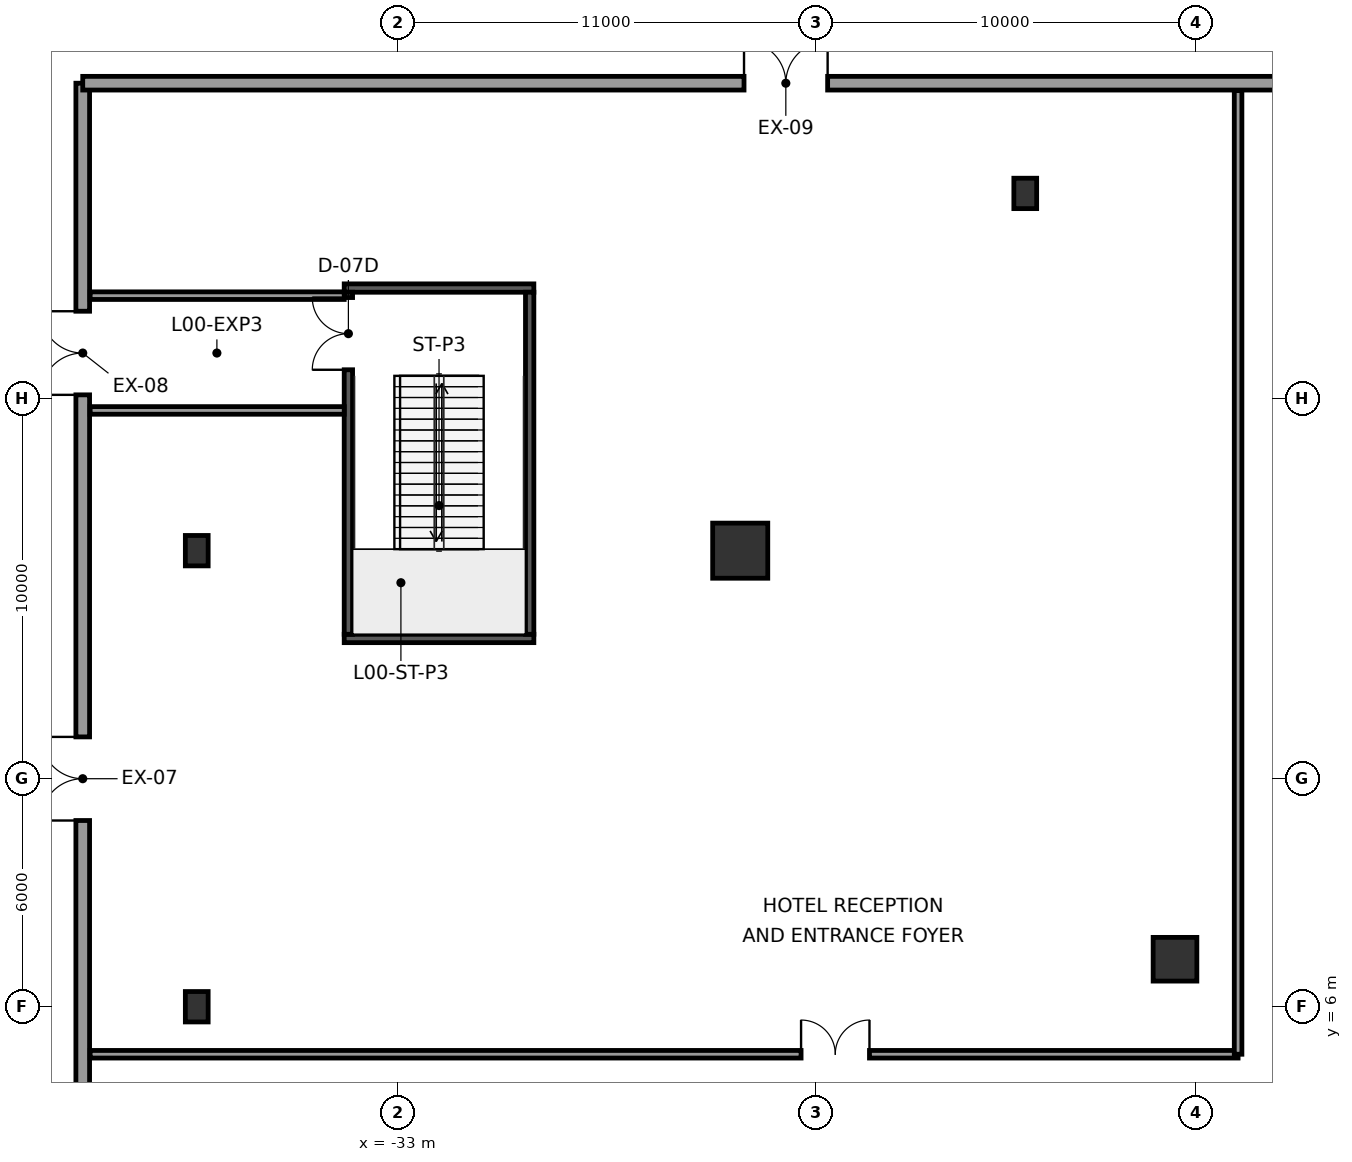
"""IFC4 building model, lengths in metres.
Left out: names, types, materials, properties, quantities, classifications, styles, units other than length and angle.
Written with IfcOpenShell. Run it as: python <this file> out.ifc"""

import sys

from ifc_helpers import new_model, si_unit, direction, frame, frame_2d, origin, origin_2d, place, context, subcontext, project, spatial, rectangle, hollow_rectangle, extrude, element, fill, save


model = new_model("IFC4")
c1 = context("Model", 3, precision=1e-05, world=origin(), true_north=direction((0.0, 1.0)))
c2 = subcontext(c1, "Body", "Model", "MODEL_VIEW")
j1 = project(units=[si_unit("LENGTHUNIT", "METRE"), si_unit("PLANEANGLEUNIT", "RADIAN")], contexts=[c1])
p1 = place(None, origin())
s1 = spatial("IfcSite", under=j1, at=p1, CompositionType="ELEMENT")
p2 = place(p1, origin())
s2 = spatial("IfcBuilding", under=s1, at=p2, CompositionType="ELEMENT")
p3 = place(p2, origin())
s3 = spatial("IfcBuildingStorey", under=s2, at=p3, CompositionType="ELEMENT", Elevation=0.0)
p4 = place(p3, frame((-12.56, 7.25, 0.0), z_axis=(0.0, 0.0, 1.0), x_axis=(1.0, 0.0, 0.0)))
e1 = element("IfcColumn", 1, at=p4, inside=s3, PredefinedType="COLUMN", context=c2, shape_type="SweptSolid", body=[
    extrude(rectangle(XDim=1.15, YDim=1.15, at=origin_2d()), origin(), (0.0, 0.0, 1.0), 6.0),
])
p5 = place(p3, frame((-24.0, 18.0, 0.0), z_axis=(0.0, 0.0, 1.0), x_axis=(1.0, 0.0, 0.0)))
e2 = element("IfcColumn", 2, at=p5, inside=s3, PredefinedType="COLUMN", context=c2, shape_type="SweptSolid", body=[
    extrude(rectangle(XDim=1.45, YDim=1.45, at=origin_2d()), origin(), (0.0, 0.0, 1.0), 6.0),
])
for number, where, z_axis, x_axis in (
    (3, (-38.3, 6.0, 0.0), (0.0, 0.0, 1.0), (1.0, 0.0, 0.0)),
    (4, (-38.3, 18.0, 0.0), (0.0, 0.0, 1.0), (1.0, 0.0, 0.0)),
    (5, (-16.5, 27.4, 0.0), (0.0, 0.0, 1.0), (1.0, 0.0, 0.0)),
):
    element("IfcColumn", number, at=place(p3, frame(where, z_axis=z_axis, x_axis=x_axis)), inside=s3, PredefinedType="COLUMN", context=c2, shape_type="SweptSolid", body=[
        extrude(hollow_rectangle(XDim=0.6, YDim=0.8, WallThickness=0.05, at=origin_2d()), origin(), (0.0, 0.0, 1.0), 6.0),
    ])
p6 = place(p3, frame((-41.3, -30.3, 0.0), z_axis=(0.0, 0.0, 1.0), x_axis=(0.0, 1.0, 0.0)))
e6 = element("IfcWall", 6, at=p6, inside=s3, PredefinedType="STANDARD", context=c2, shape_type="SweptSolid", body=[
    extrude(rectangle(XDim=60.6, YDim=0.36, at=frame_2d((30.3, 0.0))), origin(), (0.0, 0.0, 1.0), 5.7),
])
p7 = place(p6, frame((6.0, 0.0, 0.0)))
e7 = element("IfcOpeningElement", 7, at=p7, cuts=e6, PredefinedType="OPENING", context=c2, shape_type="SweptSolid", body=[
    extrude(rectangle(XDim=2.2, YDim=2.4, at=frame_2d((1.1, 1.2))), frame((0.0, 0.19, 0.0), z_axis=(0.0, -1.0, 0.0), x_axis=(1.0, 0.0, 0.0)), (0.0, 0.0, 1.0), 0.38),
])
p8 = place(p6, frame((18.0, 0.0, 0.0)))
e8 = element("IfcOpeningElement", 8, at=p8, cuts=e6, PredefinedType="OPENING", context=c2, shape_type="SweptSolid", body=[
    extrude(rectangle(XDim=2.2, YDim=2.4, at=frame_2d((1.1, 1.2))), frame((0.0, 0.19, 0.0), z_axis=(0.0, -1.0, 0.0), x_axis=(1.0, 0.0, 0.0)), (0.0, 0.0, 1.0), 0.38),
])
p9 = place(p6, frame((41.2, 0.0, 0.0)))
e9 = element("IfcOpeningElement", 9, at=p9, cuts=e6, PredefinedType="OPENING", context=c2, shape_type="SweptSolid", body=[
    extrude(rectangle(XDim=2.2, YDim=2.4, at=frame_2d((1.1, 1.2))), frame((0.0, 0.19, 0.0), z_axis=(0.0, -1.0, 0.0), x_axis=(1.0, 0.0, 0.0)), (0.0, 0.0, 1.0), 0.38),
])
p10 = place(p6, frame((52.4, 0.0, 0.0)))
e10 = element("IfcOpeningElement", 10, at=p10, cuts=e6, PredefinedType="OPENING", context=c2, shape_type="SweptSolid", body=[
    extrude(rectangle(XDim=2.2, YDim=2.4, at=frame_2d((1.1, 1.2))), frame((0.0, 0.19, 0.0), z_axis=(0.0, -1.0, 0.0), x_axis=(1.0, 0.0, 0.0)), (0.0, 0.0, 1.0), 0.38),
])
p11 = place(p3, frame((-41.3, 30.3, 0.0), z_axis=(0.0, 0.0, 1.0), x_axis=(1.0, 0.0, 0.0)))
e11 = element("IfcWall", 11, at=p11, inside=s3, PredefinedType="STANDARD", context=c2, shape_type="SweptSolid", body=[
    extrude(rectangle(XDim=82.6, YDim=0.36, at=frame_2d((41.3, 0.0))), origin(), (0.0, 0.0, 1.0), 5.7),
])
p12 = place(p11, frame((17.4, 0.0, 0.0)))
e12 = element("IfcOpeningElement", 12, at=p12, cuts=e11, PredefinedType="OPENING", context=c2, shape_type="SweptSolid", body=[
    extrude(rectangle(XDim=2.2, YDim=2.4, at=frame_2d((1.1, 1.2))), frame((0.0, 0.19, 0.0), z_axis=(0.0, -1.0, 0.0), x_axis=(1.0, 0.0, 0.0)), (0.0, 0.0, 1.0), 0.38),
])
p13 = place(p11, frame((33.4, 0.0, 0.0)))
e13 = element("IfcOpeningElement", 13, at=p13, cuts=e11, PredefinedType="OPENING", context=c2, shape_type="SweptSolid", body=[
    extrude(rectangle(XDim=2.2, YDim=2.4, at=frame_2d((1.1, 1.2))), frame((0.0, 0.19, 0.0), z_axis=(0.0, -1.0, 0.0), x_axis=(1.0, 0.0, 0.0)), (0.0, 0.0, 1.0), 0.38),
])
p14 = place(p11, frame((61.0, 0.0, 0.0)))
e14 = element("IfcOpeningElement", 14, at=p14, cuts=e11, PredefinedType="OPENING", context=c2, shape_type="SweptSolid", body=[
    extrude(rectangle(XDim=2.2, YDim=2.4, at=frame_2d((1.1, 1.2))), frame((0.0, 0.19, 0.0), z_axis=(0.0, -1.0, 0.0), x_axis=(1.0, 0.0, 0.0)), (0.0, 0.0, 1.0), 0.38),
])
p15 = place(p11, frame((71.0, 0.0, 0.0)))
e15 = element("IfcOpeningElement", 15, at=p15, cuts=e11, PredefinedType="OPENING", context=c2, shape_type="SweptSolid", body=[
    extrude(rectangle(XDim=2.2, YDim=2.4, at=frame_2d((1.1, 1.2))), frame((0.0, 0.19, 0.0), z_axis=(0.0, -1.0, 0.0), x_axis=(1.0, 0.0, 0.0)), (0.0, 0.0, 1.0), 0.38),
])
for number, where, z_axis, x_axis in (
    (16, (-34.42, 15.69, 0.0), (0.0, 0.0, 1.0), (1.0, 0.0, 0.0)),
    (17, (-34.42, 24.91, 0.0), (0.0, 0.0, 1.0), (1.0, 0.0, 0.0)),
):
    element("IfcWall", number, at=place(p3, frame(where, z_axis=z_axis, x_axis=x_axis)), inside=s3, PredefinedType="SHEAR", context=c2, shape_type="SweptSolid", body=[
        extrude(rectangle(XDim=4.99, YDim=0.22, at=frame_2d((2.495, 0.0))), origin(), (0.0, 0.0, 1.0), 5.7),
    ])
p16 = place(p3, frame((-34.31, 15.8, 0.0), z_axis=(0.0, 0.0, 1.0), x_axis=(0.0, 1.0, 0.0)))
e18 = element("IfcWall", 18, at=p16, inside=s3, PredefinedType="SHEAR", context=c2, shape_type="SweptSolid", body=[
    extrude(rectangle(XDim=9.0, YDim=0.22, at=frame_2d((4.5, 0.0))), origin(), (0.0, 0.0, 1.0), 5.7),
])
p17 = place(p16, frame((6.96, 0.0, 0.0)))
e19 = element("IfcOpeningElement", 19, at=p17, cuts=e18, PredefinedType="OPENING", context=c2, shape_type="SweptSolid", body=[
    extrude(rectangle(XDim=1.9, YDim=2.2, at=frame_2d((0.95, 1.1))), frame((0.0, 0.12, 0.0), z_axis=(0.0, -1.0, 0.0), x_axis=(1.0, 0.0, 0.0)), (0.0, 0.0, 1.0), 0.24),
])
p18 = place(p3, frame((-29.54, 24.8, 0.0), z_axis=(0.0, 0.0, 1.0), x_axis=(0.0, -1.0, 0.0)))
e20 = element("IfcWall", 20, at=p18, inside=s3, PredefinedType="SHEAR", context=c2, shape_type="SweptSolid", body=[
    extrude(rectangle(XDim=9.0, YDim=0.22, at=frame_2d((4.5, 0.0))), origin(), (0.0, 0.0, 1.0), 5.7),
])
for number, where, z_axis, x_axis in (
    (21, (-41.105, 21.69, 0.0), (0.0, 0.0, 1.0), (1.0, 0.0, 0.0)),
    (22, (-41.105, 24.71, 0.0), (0.0, 0.0, 1.0), (1.0, 0.0, 0.0)),
):
    element("IfcWall", number, at=place(p3, frame(where, z_axis=z_axis, x_axis=x_axis)), inside=s3, PredefinedType="PARTITIONING", context=c2, shape_type="SweptSolid", body=[
        extrude(rectangle(XDim=6.685, YDim=0.2, at=frame_2d((3.343, 0.0))), origin(), (0.0, 0.0, 1.0), 5.7),
    ])
p19 = place(p3, frame((-41.105, 4.75, 0.0), z_axis=(0.0, 0.0, 1.0), x_axis=(1.0, 0.0, 0.0)))
e23 = element("IfcWall", 23, at=p19, inside=s3, PredefinedType="PARTITIONING", context=c2, shape_type="SweptSolid", body=[
    extrude(rectangle(XDim=30.205, YDim=0.2, at=frame_2d((15.103, 0.0))), origin(), (0.0, 0.0, 1.0), 5.7),
])
p20 = place(p19, frame((18.706, 0.0, 0.0)))
e24 = element("IfcOpeningElement", 24, at=p20, cuts=e23, PredefinedType="OPENING", context=c2, shape_type="SweptSolid", body=[
    extrude(rectangle(XDim=1.8, YDim=2.2, at=frame_2d((0.9, 1.1))), frame((0.0, 0.11, 0.0), z_axis=(0.0, -1.0, 0.0), x_axis=(1.0, 0.0, 0.0)), (0.0, 0.0, 1.0), 0.22),
])
p21 = place(p3, frame((-10.9, 4.75, 0.0), z_axis=(0.0, 0.0, 1.0), x_axis=(0.0, 1.0, 0.0)))
e25 = element("IfcWall", 25, at=p21, inside=s3, PredefinedType="PARTITIONING", context=c2, shape_type="SweptSolid", body=[
    extrude(rectangle(XDim=25.355, YDim=0.2, at=frame_2d((12.677, 0.0))), origin(), (0.0, 0.0, 1.0), 5.7),
])
p22 = place(p9, origin())
e26 = element("IfcDoor", 26, at=p22, inside=s3, OperationType="DOUBLE_DOOR_SINGLE_SWING", PredefinedType="DOOR", context=c2, shape_type="SweptSolid", body=[
    extrude(rectangle(XDim=2.2, YDim=2.4, at=frame_2d((1.1, 1.2))), frame((0.0, 0.025, 0.0), z_axis=(0.0, -1.0, 0.0), x_axis=(1.0, 0.0, 0.0)), (0.0, 0.0, 1.0), 0.05),
])
fill(e9, e26)
p23 = place(p10, origin())
e27 = element("IfcDoor", 27, at=p23, inside=s3, OperationType="DOUBLE_DOOR_SINGLE_SWING", PredefinedType="DOOR", context=c2, shape_type="SweptSolid", body=[
    extrude(rectangle(XDim=2.2, YDim=2.4, at=frame_2d((1.1, 1.2))), frame((0.0, 0.025, 0.0), z_axis=(0.0, -1.0, 0.0), x_axis=(1.0, 0.0, 0.0)), (0.0, 0.0, 1.0), 0.05),
])
fill(e10, e27)
p24 = place(p12, origin())
e28 = element("IfcDoor", 28, at=p24, inside=s3, OperationType="DOUBLE_DOOR_SINGLE_SWING", PredefinedType="DOOR", context=c2, shape_type="SweptSolid", body=[
    extrude(rectangle(XDim=2.2, YDim=2.4, at=frame_2d((1.1, 1.2))), frame((0.0, 0.025, 0.0), z_axis=(0.0, -1.0, 0.0), x_axis=(1.0, 0.0, 0.0)), (0.0, 0.0, 1.0), 0.05),
])
fill(e12, e28)
p25 = place(p17, origin())
e29 = element("IfcDoor", 29, at=p25, inside=s3, OperationType="DOUBLE_DOOR_SINGLE_SWING", PredefinedType="DOOR", context=c2, shape_type="SweptSolid", body=[
    extrude(rectangle(XDim=1.9, YDim=2.2, at=frame_2d((0.95, 1.1))), frame((0.0, 0.025, 0.0), z_axis=(0.0, -1.0, 0.0), x_axis=(1.0, 0.0, 0.0)), (0.0, 0.0, 1.0), 0.05),
])
fill(e19, e29)
p26 = place(p20, origin())
e30 = element("IfcDoor", 30, at=p26, inside=s3, OperationType="DOUBLE_DOOR_SINGLE_SWING", PredefinedType="DOOR", context=c2, shape_type="SweptSolid", body=[
    extrude(rectangle(XDim=1.8, YDim=2.2, at=frame_2d((0.9, 1.1))), frame((0.0, 0.025, 0.0), z_axis=(0.0, -1.0, 0.0), x_axis=(1.0, 0.0, 0.0)), (0.0, 0.0, 1.0), 0.05),
])
fill(e24, e30)
save(model, sys.argv[1])
